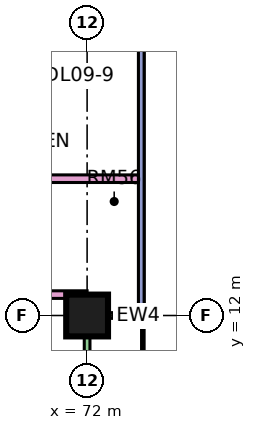
"""IFC4 building model, lengths in metres.
Left out: names, types, materials, properties, quantities, classifications, styles, units other than length and angle.
Written with IfcOpenShell. Run it as: python <this file> out.ifc"""

import sys

from ifc_helpers import new_model, si_unit, direction, frame, frame_2d, origin, origin_2d, place, context, subcontext, project, spatial, rectangle, extrude, element, save


model = new_model("IFC4")
c1 = context("Model", 3, precision=1e-05, world=origin(), true_north=direction((0.0, 1.0)))
c2 = subcontext(c1, "Body", "Model", "MODEL_VIEW")
j1 = project(units=[si_unit("LENGTHUNIT", "METRE"), si_unit("PLANEANGLEUNIT", "RADIAN")], contexts=[c1])
p1 = place(None, origin())
s1 = spatial("IfcSite", under=j1, at=p1, CompositionType="ELEMENT")
p2 = place(p1, origin())
s2 = spatial("IfcBuilding", under=s1, at=p2, CompositionType="ELEMENT")
p3 = place(p2, frame((0.0, 0.0, 48.9)))
s3 = spatial("IfcBuildingStorey", under=s2, at=p3, CompositionType="ELEMENT", Elevation=48.9)
p4 = place(p3, frame((72.0, 12.0, 0.0), z_axis=(0.0, 0.0, 1.0), x_axis=(1.0, 0.0, 0.0)))
e1 = element("IfcColumn", 1, at=p4, inside=s3, PredefinedType="COLUMN", context=c2, shape_type="SweptSolid", body=[
    extrude(rectangle(XDim=1.1, YDim=1.1, at=origin_2d()), origin(), (0.0, 0.0, 1.0), 3.75),
])
p5 = place(p3, frame((72.0, 1.575, 0.0), z_axis=(0.0, 0.0, 1.0), x_axis=(0.0, 1.0, 0.0)))
e2 = element("IfcWall", 2, at=p5, inside=s3, PredefinedType="SOLIDWALL", context=c2, shape_type="SweptSolid", body=[
    extrude(rectangle(XDim=10.35, YDim=0.15, at=frame_2d((5.175, 0.0))), origin(), (0.0, 0.0, 1.0), 3.35),
])
p6 = place(p5, frame((1.288, 0.0, 0.0)))
e3 = element("IfcOpeningElement", 3, at=p6, cuts=e2, PredefinedType="OPENING", context=c2, shape_type="SweptSolid", body=[
    extrude(rectangle(XDim=1.8, YDim=2.4, at=frame_2d((0.9, 1.2))), frame((0.0, 0.085, 0.0), z_axis=(0.0, -1.0, 0.0), x_axis=(1.0, 0.0, 0.0)), (0.0, 0.0, 1.0), 0.17),
])
p7 = place(p5, frame((6.175, 0.0, 0.45)))
e4 = element("IfcOpeningElement", 4, at=p7, cuts=e2, PredefinedType="OPENING", context=c2, shape_type="SweptSolid", body=[
    extrude(rectangle(XDim=3.0, YDim=2.4, at=frame_2d((1.5, 1.2))), frame((0.0, 0.085, 0.0), z_axis=(0.0, -1.0, 0.0), x_axis=(1.0, 0.0, 0.0)), (0.0, 0.0, 1.0), 0.17),
])
p8 = place(p3, frame((73.5, 12.0, 0.0), z_axis=(0.0, 0.0, 1.0), x_axis=(-1.0, 0.0, 0.0)))
e5 = element("IfcWall", 5, at=p8, inside=s3, PredefinedType="SOLIDWALL", context=c2, shape_type="SweptSolid", body=[
    extrude(rectangle(XDim=1.5, YDim=0.15, at=frame_2d((0.75, 0.0))), origin(), (0.0, 0.0, 1.0), 3.35),
])
p9 = place(p3, frame((73.425, 12.075, 0.0), z_axis=(0.0, 0.0, 1.0), x_axis=(0.0, 1.0, 0.0)))
e6 = element("IfcWall", 6, at=p9, inside=s3, PredefinedType="SOLIDWALL", context=c2, shape_type="SweptSolid", body=[
    extrude(rectangle(XDim=10.425, YDim=0.15, at=frame_2d((5.212, 0.0))), origin(), (0.0, 0.0, 1.0), 3.35),
])
p10 = place(p9, frame((8.025, 0.0, 0.45)))
e7 = element("IfcOpeningElement", 7, at=p10, cuts=e6, PredefinedType="OPENING", context=c2, shape_type="SweptSolid", body=[
    extrude(rectangle(XDim=1.8, YDim=2.4, at=frame_2d((0.9, 1.2))), frame((0.0, 0.085, 0.0), z_axis=(0.0, -1.0, 0.0), x_axis=(1.0, 0.0, 0.0)), (0.0, 0.0, 1.0), 0.17),
])
p11 = place(p3, frame((40.65, 12.55, 0.0), z_axis=(0.0, 0.0, 1.0), x_axis=(1.0, 0.0, 0.0)))
e8 = element("IfcWall", 8, at=p11, inside=s3, PredefinedType="PARTITIONING", context=c2, shape_type="SweptSolid", body=[
    extrude(rectangle(XDim=31.35, YDim=0.2, at=frame_2d((15.675, 0.0))), origin(), (0.0, 0.0, 1.0), 3.35),
])
p12 = place(p11, frame((24.0, 0.0, 0.0)))
e9 = element("IfcOpeningElement", 9, at=p12, cuts=e8, PredefinedType="OPENING", context=c2, shape_type="SweptSolid", body=[
    extrude(rectangle(XDim=1.0, YDim=2.1, at=frame_2d((0.5, 1.05))), frame((0.0, 0.11, 0.0), z_axis=(0.0, -1.0, 0.0), x_axis=(1.0, 0.0, 0.0)), (0.0, 0.0, 1.0), 0.22),
])
p13 = place(p11, frame((1.05, 0.0, 0.0)))
e10 = element("IfcOpeningElement", 10, at=p13, cuts=e8, PredefinedType="OPENING", context=c2, shape_type="SweptSolid", body=[
    extrude(rectangle(XDim=1.0, YDim=2.1, at=frame_2d((0.5, 1.05))), frame((0.0, 0.11, 0.0), z_axis=(0.0, -1.0, 0.0), x_axis=(1.0, 0.0, 0.0)), (0.0, 0.0, 1.0), 0.22),
])
p14 = place(p3, frame((51.225, 15.6, 0.0), z_axis=(0.0, 0.0, 1.0), x_axis=(1.0, 0.0, 0.0)))
e11 = element("IfcWall", 11, at=p14, inside=s3, PredefinedType="PARTITIONING", context=c2, shape_type="SweptSolid", body=[
    extrude(rectangle(XDim=22.125, YDim=0.2, at=frame_2d((11.062, 0.0))), origin(), (0.0, 0.0, 1.0), 3.35),
])
p15 = place(p14, frame((3.575, 0.0, 0.0)))
e12 = element("IfcOpeningElement", 12, at=p15, cuts=e11, PredefinedType="OPENING", context=c2, shape_type="SweptSolid", body=[
    extrude(rectangle(XDim=1.0, YDim=2.1, at=frame_2d((0.5, 1.05))), frame((0.0, 0.11, 0.0), z_axis=(0.0, -1.0, 0.0), x_axis=(1.0, 0.0, 0.0)), (0.0, 0.0, 1.0), 0.22),
])
p16 = place(p14, frame((0.875, 0.0, 0.0)))
e13 = element("IfcOpeningElement", 13, at=p16, cuts=e11, PredefinedType="OPENING", context=c2, shape_type="SweptSolid", body=[
    extrude(rectangle(XDim=1.0, YDim=2.1, at=frame_2d((0.5, 1.05))), frame((0.0, 0.11, 0.0), z_axis=(0.0, -1.0, 0.0), x_axis=(1.0, 0.0, 0.0)), (0.0, 0.0, 1.0), 0.22),
])
p17 = place(p3, frame((56.625, 18.3, 0.0), z_axis=(0.0, 0.0, 1.0), x_axis=(1.0, 0.0, 0.0)))
e14 = element("IfcWall", 14, at=p17, inside=s3, PredefinedType="PARTITIONING", context=c2, shape_type="SweptSolid", body=[
    extrude(rectangle(XDim=15.425, YDim=0.15, at=frame_2d((7.712, 0.0))), origin(), (0.0, 0.0, 1.0), 3.35),
])
p18 = place(p17, frame((10.275, 0.0, 0.0)))
e15 = element("IfcOpeningElement", 15, at=p18, cuts=e14, PredefinedType="OPENING", context=c2, shape_type="SweptSolid", body=[
    extrude(rectangle(XDim=0.8, YDim=2.1, at=frame_2d((0.4, 1.05))), frame((0.0, 0.085, 0.0), z_axis=(0.0, -1.0, 0.0), x_axis=(1.0, 0.0, 0.0)), (0.0, 0.0, 1.0), 0.17),
])
p19 = place(p17, frame((13.125, 0.0, 0.0)))
e16 = element("IfcOpeningElement", 16, at=p19, cuts=e14, PredefinedType="OPENING", context=c2, shape_type="SweptSolid", body=[
    extrude(rectangle(XDim=0.9, YDim=2.1, at=frame_2d((0.45, 1.05))), frame((0.0, 0.085, 0.0), z_axis=(0.0, -1.0, 0.0), x_axis=(1.0, 0.0, 0.0)), (0.0, 0.0, 1.0), 0.17),
])
p20 = place(p17, frame((7.425, 0.0, 0.0)))
e17 = element("IfcOpeningElement", 17, at=p20, cuts=e14, PredefinedType="OPENING", context=c2, shape_type="SweptSolid", body=[
    extrude(rectangle(XDim=0.8, YDim=2.1, at=frame_2d((0.4, 1.05))), frame((0.0, 0.085, 0.0), z_axis=(0.0, -1.0, 0.0), x_axis=(1.0, 0.0, 0.0)), (0.0, 0.0, 1.0), 0.17),
])
p21 = place(p17, frame((4.125, 0.0, 0.0)))
e18 = element("IfcOpeningElement", 18, at=p21, cuts=e14, PredefinedType="OPENING", context=c2, shape_type="SweptSolid", body=[
    extrude(rectangle(XDim=0.9, YDim=2.1, at=frame_2d((0.45, 1.05))), frame((0.0, 0.085, 0.0), z_axis=(0.0, -1.0, 0.0), x_axis=(1.0, 0.0, 0.0)), (0.0, 0.0, 1.0), 0.17),
])
p22 = place(p17, frame((1.125, 0.0, 0.0)))
e19 = element("IfcOpeningElement", 19, at=p22, cuts=e14, PredefinedType="OPENING", context=c2, shape_type="SweptSolid", body=[
    extrude(rectangle(XDim=0.8, YDim=2.1, at=frame_2d((0.4, 1.05))), frame((0.0, 0.085, 0.0), z_axis=(0.0, -1.0, 0.0), x_axis=(1.0, 0.0, 0.0)), (0.0, 0.0, 1.0), 0.17),
])
p23 = place(p3, frame((72.0, 18.0, 0.0), z_axis=(0.0, 0.0, 1.0), x_axis=(0.0, 1.0, 0.0)))
e20 = element("IfcWall", 20, at=p23, inside=s3, PredefinedType="PARTITIONING", context=c2, shape_type="SweptSolid", body=[
    extrude(rectangle(XDim=0.225, YDim=0.1, at=frame_2d((0.113, 0.0))), origin(), (0.0, 0.0, 1.0), 3.35),
])
save(model, sys.argv[1])
